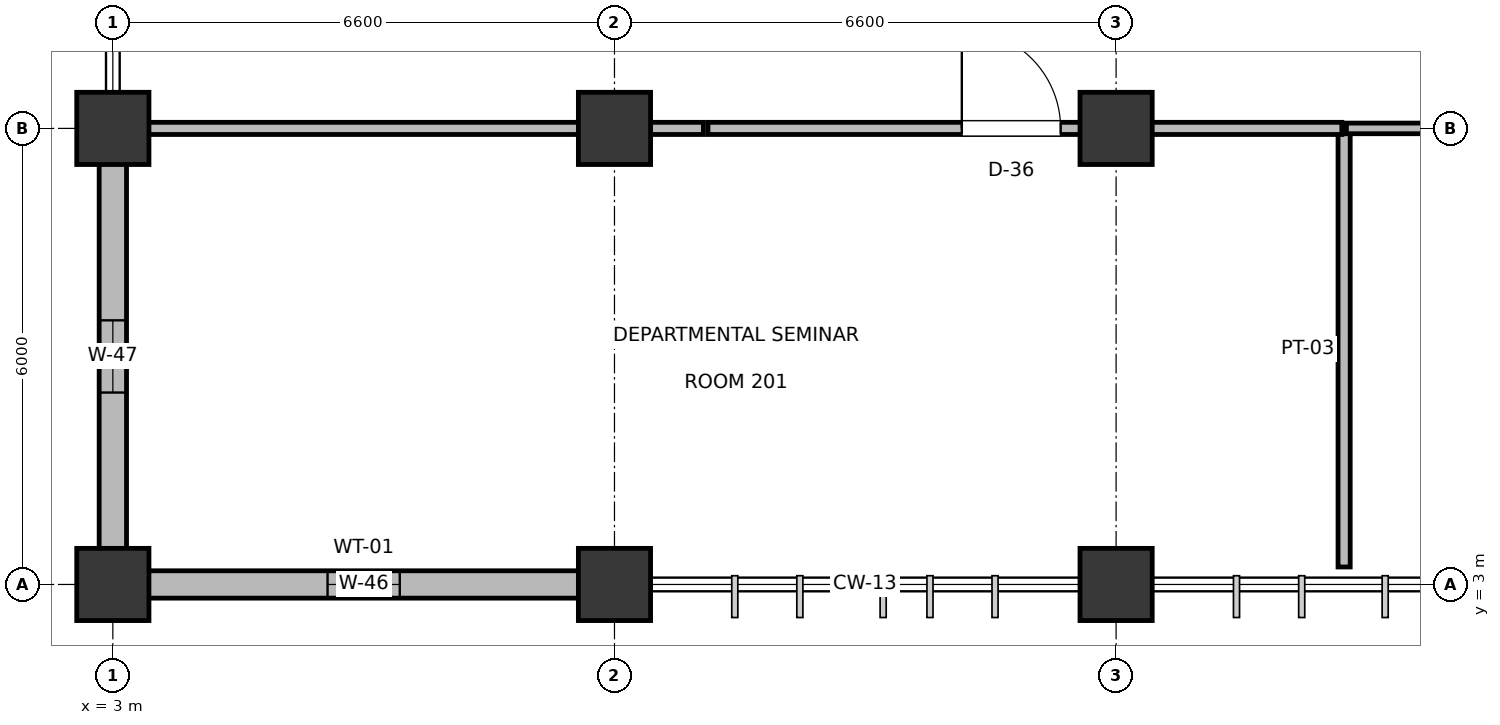
"""IFC4 building model, lengths in metres.
Left out: names, types, materials, properties, quantities, classifications, styles, units other than length and angle.
Written with IfcOpenShell. Run it as: python <this file> out.ifc"""

import sys

from ifc_helpers import new_model, si_unit, direction, frame, frame_2d, origin, origin_2d, place, context, subcontext, project, spatial, rectangle, extrude, element, fill, save


model = new_model("IFC4")
c1 = context("Model", 3, precision=1e-05, world=origin(), true_north=direction((0.0, 1.0)))
c2 = subcontext(c1, "Body", "Model", "MODEL_VIEW")
j1 = project(units=[si_unit("LENGTHUNIT", "METRE"), si_unit("PLANEANGLEUNIT", "RADIAN")], contexts=[c1])
p1 = place(None, origin())
s1 = spatial("IfcSite", under=j1, at=p1, CompositionType="ELEMENT")
p2 = place(p1, origin())
s2 = spatial("IfcBuilding", under=s1, at=p2, CompositionType="ELEMENT")
p3 = place(p2, frame((0.0, 0.0, 10.2)))
s3 = spatial("IfcBuildingStorey", under=s2, at=p3, CompositionType="ELEMENT", Elevation=10.2)
for number, where, z_axis, x_axis in (
    (1, (3.0, 3.0, 0.0), (0.0, 0.0, 1.0), (1.0, 0.0, 0.0)),
    (2, (3.0, 9.0, 0.0), (0.0, 0.0, 1.0), (1.0, 0.0, 0.0)),
    (3, (9.6, 3.0, 0.0), (0.0, 0.0, 1.0), (1.0, 0.0, 0.0)),
    (4, (9.6, 9.0, 0.0), (0.0, 0.0, 1.0), (1.0, 0.0, 0.0)),
    (5, (16.2, 3.0, 0.0), (0.0, 0.0, 1.0), (1.0, 0.0, 0.0)),
    (6, (16.2, 9.0, 0.0), (0.0, 0.0, 1.0), (1.0, 0.0, 0.0)),
):
    element("IfcColumn", number, at=place(p3, frame(where, z_axis=z_axis, x_axis=x_axis)), inside=s3, PredefinedType="COLUMN", context=c2, shape_type="SweptSolid", body=[
        extrude(rectangle(XDim=0.95, YDim=0.95, at=origin_2d()), origin(), (0.0, 0.0, 1.0), 4.8),
    ])
p4 = place(p3, frame((3.465, 3.0, 0.0), z_axis=(0.0, 0.0, 1.0), x_axis=(1.0, 0.0, 0.0)))
e7 = element("IfcWall", 7, at=p4, inside=s3, PredefinedType="SOLIDWALL", context=c2, shape_type="SweptSolid", body=[
    extrude(rectangle(XDim=5.67, YDim=0.36, at=frame_2d((2.835, 0.0))), origin(), (0.0, 0.0, 1.0), 2.87),
])
p5 = place(p4, frame((2.36, 0.0, 0.9)))
e8 = element("IfcOpeningElement", 8, at=p5, cuts=e7, PredefinedType="OPENING", context=c2, shape_type="SweptSolid", body=[
    extrude(rectangle(XDim=0.95, YDim=1.35, at=frame_2d((0.475, 0.675))), frame((0.0, 0.19, 0.0), z_axis=(0.0, -1.0, 0.0), x_axis=(1.0, 0.0, 0.0)), (0.0, 0.0, 1.0), 0.38),
])
p6 = place(p3, frame((3.0, 3.465, 0.0), z_axis=(0.0, 0.0, 1.0), x_axis=(0.0, 1.0, 0.0)))
e9 = element("IfcWall", 9, at=p6, inside=s3, PredefinedType="SOLIDWALL", context=c2, shape_type="SweptSolid", body=[
    extrude(rectangle(XDim=5.07, YDim=0.36, at=frame_2d((2.535, 0.0))), origin(), (0.0, 0.0, 1.0), 3.875),
])
p7 = place(p6, frame((2.06, 0.0, 0.9)))
e10 = element("IfcOpeningElement", 10, at=p7, cuts=e9, PredefinedType="OPENING", context=c2, shape_type="SweptSolid", body=[
    extrude(rectangle(XDim=0.95, YDim=1.55, at=frame_2d((0.475, 0.775))), frame((0.0, 0.19, 0.0), z_axis=(0.0, -1.0, 0.0), x_axis=(1.0, 0.0, 0.0)), (0.0, 0.0, 1.0), 0.38),
])
p8 = place(p3, frame((19.2, 3.23, 0.0), z_axis=(0.0, 0.0, 1.0), x_axis=(0.0, 1.0, 0.0)))
e11 = element("IfcWall", 11, at=p8, inside=s3, PredefinedType="PARTITIONING", context=c2, shape_type="SweptSolid", body=[
    extrude(rectangle(XDim=5.74, YDim=0.16, at=frame_2d((2.87, 0.0))), origin(), (0.0, 0.0, 1.0), 3.825),
])
p9 = place(p3, frame((3.23, 9.0, 0.0), z_axis=(0.0, 0.0, 1.0), x_axis=(1.0, 0.0, 0.0)))
e12 = element("IfcWall", 12, at=p9, inside=s3, PredefinedType="PARTITIONING", context=c2, shape_type="SweptSolid", body=[
    extrude(rectangle(XDim=7.54, YDim=0.16, at=frame_2d((3.77, 0.0))), origin(), (0.0, 0.0, 1.0), 3.695),
])
p10 = place(p3, frame((10.83, 9.0, 0.0), z_axis=(0.0, 0.0, 1.0), x_axis=(1.0, 0.0, 0.0)))
e13 = element("IfcWall", 13, at=p10, inside=s3, PredefinedType="PARTITIONING", context=c2, shape_type="SweptSolid", body=[
    extrude(rectangle(XDim=8.34, YDim=0.16, at=frame_2d((4.17, 0.0))), origin(), (0.0, 0.0, 1.0), 3.695),
])
p11 = place(p10, frame((3.34, 0.0, 0.0)))
e14 = element("IfcOpeningElement", 14, at=p11, cuts=e13, PredefinedType="OPENING", context=c2, shape_type="SweptSolid", body=[
    extrude(rectangle(XDim=1.3, YDim=2.2, at=frame_2d((0.65, 1.1))), frame((0.0, 0.09, 0.0), z_axis=(0.0, -1.0, 0.0), x_axis=(1.0, 0.0, 0.0)), (0.0, 0.0, 1.0), 0.18),
])
p12 = place(p3, frame((19.23, 9.0, 0.0), z_axis=(0.0, 0.0, 1.0), x_axis=(1.0, 0.0, 0.0)))
e15 = element("IfcWall", 15, at=p12, inside=s3, PredefinedType="PARTITIONING", context=c2, shape_type="SweptSolid", body=[
    extrude(rectangle(XDim=4.74, YDim=0.14, at=frame_2d((2.37, 0.0))), origin(), (0.0, 0.0, 1.0), 3.715),
])
p13 = place(p5, frame((0.95, 0.0, 0.0), z_axis=(0.0, 0.0, 1.0), x_axis=(-1.0, 0.0, 0.0)))
e16 = element("IfcWindow", 16, at=p13, inside=s3, PartitioningType="DOUBLE_PANEL_VERTICAL", PredefinedType="WINDOW", context=c2, shape_type="SweptSolid", body=[
    extrude(rectangle(XDim=0.95, YDim=1.35, at=frame_2d((0.475, 0.675))), frame((0.0, 0.03, 0.0), z_axis=(0.0, -1.0, 0.0), x_axis=(1.0, 0.0, 0.0)), (0.0, 0.0, 1.0), 0.06),
])
fill(e8, e16)
p14 = place(p7, origin())
e17 = element("IfcWindow", 17, at=p14, inside=s3, PartitioningType="DOUBLE_PANEL_VERTICAL", PredefinedType="WINDOW", context=c2, shape_type="SweptSolid", body=[
    extrude(rectangle(XDim=0.95, YDim=1.55, at=frame_2d((0.475, 0.775))), frame((0.0, 0.03, 0.0), z_axis=(0.0, -1.0, 0.0), x_axis=(1.0, 0.0, 0.0)), (0.0, 0.0, 1.0), 0.06),
])
fill(e10, e17)
p15 = place(p11, origin())
e18 = element("IfcDoor", 18, at=p15, inside=s3, OperationType="SINGLE_SWING_LEFT", PredefinedType="DOOR", context=c2, shape_type="SweptSolid", body=[
    extrude(rectangle(XDim=1.3, YDim=2.2, at=frame_2d((0.65, 1.1))), frame((0.0, 0.025, 0.0), z_axis=(0.0, -1.0, 0.0), x_axis=(1.0, 0.0, 0.0)), (0.0, 0.0, 1.0), 0.05),
])
fill(e14, e18)
save(model, sys.argv[1])
